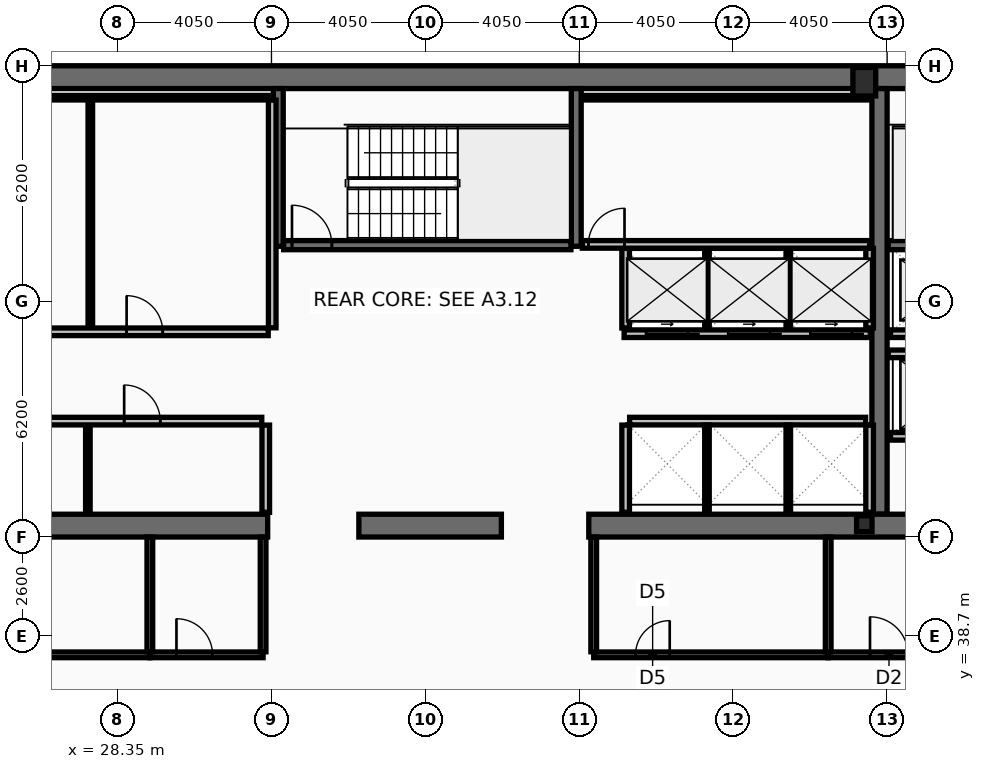
"""IFC4 building model, lengths in metres.
Left out: names, types, materials, properties, quantities, classifications, styles, units other than length and angle.
Written with IfcOpenShell. Run it as: python <this file> out.ifc"""

import sys

from ifc_helpers import new_model, si_unit, direction, frame, frame_2d, origin, origin_2d, place, context, subcontext, project, spatial, rectangle, hollow_rectangle, i_section, extrude, element, fill, save


model = new_model("IFC4")
c1 = context("Model", 3, precision=1e-05, world=origin(), true_north=direction((0.0, 1.0)))
c2 = subcontext(c1, "Body", "Model", "MODEL_VIEW")
j1 = project(units=[si_unit("LENGTHUNIT", "METRE"), si_unit("PLANEANGLEUNIT", "RADIAN")], contexts=[c1])
p1 = place(None, origin())
s1 = spatial("IfcSite", under=j1, at=p1, CompositionType="ELEMENT")
p2 = place(p1, origin())
s2 = spatial("IfcBuilding", under=s1, at=p2, CompositionType="ELEMENT")
p3 = place(p2, frame((0.0, 0.0, 253.4)))
s3 = spatial("IfcBuildingStorey", under=s2, at=p3, CompositionType="ELEMENT", Elevation=253.4)
p4 = place(p3, frame((16.2, 53.4, 0.0), z_axis=(0.0, 0.0, 1.0), x_axis=(1.0, 0.0, 0.0)))
e1 = element("IfcWall", 1, at=p4, inside=s3, PredefinedType="SHEAR", context=c2, shape_type="SweptSolid", body=[
    extrude(rectangle(XDim=40.5, YDim=0.6, at=frame_2d((20.25, 0.0))), origin(), (0.0, 0.0, 1.0), 3.38),
])
p5 = place(p3, frame((48.4, 41.9, 0.0), z_axis=(0.0, 0.0, 1.0), x_axis=(0.0, 1.0, 0.0)))
e2 = element("IfcWall", 2, at=p5, inside=s3, PredefinedType="SHEAR", context=c2, shape_type="SweptSolid", body=[
    extrude(rectangle(XDim=11.2, YDim=0.4, at=frame_2d((5.6, 0.0))), origin(), (0.0, 0.0, 1.0), 3.38),
])
p6 = place(p3, frame((32.3, 41.6, 0.0), z_axis=(0.0, 0.0, 1.0), x_axis=(-1.0, 0.0, 0.0)))
e3 = element("IfcWall", 3, at=p6, inside=s3, PredefinedType="SHEAR", context=c2, shape_type="SweptSolid", body=[
    extrude(rectangle(XDim=11.45, YDim=0.6, at=frame_2d((5.725, 0.0))), origin(), (0.0, 0.0, 1.0), 3.38),
])
p7 = place(p3, frame((38.45, 41.6, 0.0), z_axis=(0.0, 0.0, 1.0), x_axis=(-1.0, 0.0, 0.0)))
e4 = element("IfcWall", 4, at=p7, inside=s3, PredefinedType="SHEAR", context=c2, shape_type="SweptSolid", body=[
    extrude(rectangle(XDim=3.75, YDim=0.6, at=frame_2d((1.875, 0.0))), origin(), (0.0, 0.0, 1.0), 3.38),
])
p8 = place(p3, frame((52.05, 41.6, 0.0), z_axis=(0.0, 0.0, 1.0), x_axis=(-1.0, 0.0, 0.0)))
e5 = element("IfcWall", 5, at=p8, inside=s3, PredefinedType="SHEAR", context=c2, shape_type="SweptSolid", body=[
    extrude(rectangle(XDim=11.3, YDim=0.6, at=frame_2d((5.65, 0.0))), origin(), (0.0, 0.0, 1.0), 3.38),
])
for number, where, z_axis, x_axis in (
    (6, (32.58, 48.95, 0.0), (0.0, 0.0, 1.0), (0.0, 1.0, 0.0)),
    (7, (40.42, 48.95, 0.0), (0.0, 0.0, 1.0), (0.0, 1.0, 0.0)),
):
    element("IfcWall", number, at=place(p3, frame(where, z_axis=z_axis, x_axis=x_axis)), inside=s3, PredefinedType="SHEAR", context=c2, shape_type="SweptSolid", body=[
        extrude(rectangle(XDim=4.15, YDim=0.26, at=frame_2d((2.075, 0.0))), origin(), (0.0, 0.0, 1.0), 3.38),
    ])
p9 = place(p3, frame((48.63, 48.98, 0.0), z_axis=(0.0, 0.0, 1.0), x_axis=(1.0, 0.0, 0.0)))
e8 = element("IfcWall", 8, at=p9, inside=s3, PredefinedType="SHEAR", context=c2, shape_type="SweptSolid", body=[
    extrude(rectangle(XDim=7.47, YDim=0.24, at=frame_2d((3.735, 0.0))), origin(), (0.0, 0.0, 1.0), 3.38),
])
p10 = place(p9, frame((6.2, 0.0, 0.0)))
e9 = element("IfcOpeningElement", 9, at=p10, cuts=e8, PredefinedType="OPENING", context=c2, shape_type="SweptSolid", body=[
    extrude(rectangle(XDim=1.05, YDim=2.15, at=frame_2d((0.525, 1.075))), frame((0.0, 0.13, 0.0), z_axis=(0.0, -1.0, 0.0), x_axis=(1.0, 0.0, 0.0)), (0.0, 0.0, 1.0), 0.26),
])
p11 = place(p3, frame((32.72, 48.98, 0.0), z_axis=(0.0, 0.0, 1.0), x_axis=(1.0, 0.0, 0.0)))
e10 = element("IfcWall", 10, at=p11, inside=s3, PredefinedType="SHEAR", context=c2, shape_type="SweptSolid", body=[
    extrude(rectangle(XDim=7.56, YDim=0.24, at=frame_2d((3.78, 0.0))), origin(), (0.0, 0.0, 1.0), 3.38),
])
p12 = place(p11, frame((0.22, 0.0, 0.0)))
e11 = element("IfcOpeningElement", 11, at=p12, cuts=e10, PredefinedType="OPENING", context=c2, shape_type="SweptSolid", body=[
    extrude(rectangle(XDim=1.05, YDim=2.15, at=frame_2d((0.525, 1.075))), frame((0.0, 0.13, 0.0), z_axis=(0.0, -1.0, 0.0), x_axis=(1.0, 0.0, 0.0)), (0.0, 0.0, 1.0), 0.26),
])
p13 = place(p3, frame((48.0, 53.28, 0.0), z_axis=(0.0, 0.0, 1.0), x_axis=(1.0, 0.0, 0.0)))
e12 = element("IfcColumn", 12, at=p13, inside=s3, PredefinedType="COLUMN", context=c2, shape_type="SweptSolid", body=[
    extrude(hollow_rectangle(XDim=0.6, YDim=0.75, WallThickness=0.045, at=origin_2d()), origin(), (0.0, 0.0, 1.0), 3.6),
])
p14 = place(p3, frame((48.0, 41.65, 0.0), z_axis=(0.0, 0.0, 1.0), x_axis=(1.0, 0.0, 0.0)))
e13 = element("IfcColumn", 13, at=p14, inside=s3, PredefinedType="COLUMN", context=c2, shape_type="SweptSolid", body=[
    extrude(i_section(OverallWidth=0.406, OverallDepth=0.416, WebThickness=0.03, FlangeThickness=0.048, at=origin_2d()), origin(), (0.0, 0.0, 1.0), 3.6),
])
p15 = place(p3, frame((51.61, 43.95, 0.0), z_axis=(0.0, 0.0, 1.0), x_axis=(-1.0, 0.0, 0.0)))
e14 = element("IfcWall", 14, at=p15, inside=s3, PredefinedType="PARTITIONING", context=c2, shape_type="SweptSolid", body=[
    extrude(rectangle(XDim=2.92, YDim=0.2, at=frame_2d((1.46, 0.0))), origin(), (0.0, 0.0, 1.0), 3.38),
])
p16 = place(p15, frame((0.81, 0.0, 0.0)))
e15 = element("IfcOpeningElement", 15, at=p16, cuts=e14, PredefinedType="OPENING", context=c2, shape_type="SweptSolid", body=[
    extrude(rectangle(XDim=1.3, YDim=2.18, at=frame_2d((0.65, 1.09))), frame((0.0, 0.11, 0.0), z_axis=(0.0, -1.0, 0.0), x_axis=(1.0, 0.0, 0.0)), (0.0, 0.0, 1.0), 0.22),
])
p17 = place(p3, frame((51.61, 46.65, 0.0), z_axis=(0.0, 0.0, 1.0), x_axis=(-1.0, 0.0, 0.0)))
e16 = element("IfcWall", 16, at=p17, inside=s3, PredefinedType="PARTITIONING", context=c2, shape_type="SweptSolid", body=[
    extrude(rectangle(XDim=2.92, YDim=0.2, at=frame_2d((1.46, 0.0))), origin(), (0.0, 0.0, 1.0), 3.38),
])
p18 = place(p17, frame((0.86, 0.0, 0.0)))
e17 = element("IfcOpeningElement", 17, at=p18, cuts=e16, PredefinedType="OPENING", context=c2, shape_type="SweptSolid", body=[
    extrude(rectangle(XDim=1.2, YDim=2.18, at=frame_2d((0.6, 1.09))), frame((0.0, 0.11, 0.0), z_axis=(0.0, -1.0, 0.0), x_axis=(1.0, 0.0, 0.0)), (0.0, 0.0, 1.0), 0.22),
])
p19 = place(p3, frame((48.16, 46.65, 0.0), z_axis=(0.0, 0.0, 1.0), x_axis=(-1.0, 0.0, 0.0)))
e18 = element("IfcWall", 18, at=p19, inside=s3, PredefinedType="PARTITIONING", context=c2, shape_type="SweptSolid", body=[
    extrude(rectangle(XDim=6.48, YDim=0.2, at=frame_2d((3.24, 0.0))), origin(), (0.0, 0.0, 1.0), 3.38),
])
p20 = place(p19, frame((4.8, 0.0, 0.0)))
e19 = element("IfcOpeningElement", 19, at=p20, cuts=e18, PredefinedType="OPENING", context=c2, shape_type="SweptSolid", body=[
    extrude(rectangle(XDim=1.1, YDim=2.18, at=frame_2d((0.55, 1.09))), frame((0.0, 0.11, 0.0), z_axis=(0.0, -1.0, 0.0), x_axis=(1.0, 0.0, 0.0)), (0.0, 0.0, 1.0), 0.22),
])
p21 = place(p19, frame((2.64, 0.0, 0.0)))
e20 = element("IfcOpeningElement", 20, at=p21, cuts=e18, PredefinedType="OPENING", context=c2, shape_type="SweptSolid", body=[
    extrude(rectangle(XDim=1.1, YDim=2.18, at=frame_2d((0.55, 1.09))), frame((0.0, 0.11, 0.0), z_axis=(0.0, -1.0, 0.0), x_axis=(1.0, 0.0, 0.0)), (0.0, 0.0, 1.0), 0.22),
])
p22 = place(p19, frame((0.48, 0.0, 0.0)))
e21 = element("IfcOpeningElement", 21, at=p22, cuts=e18, PredefinedType="OPENING", context=c2, shape_type="SweptSolid", body=[
    extrude(rectangle(XDim=1.1, YDim=2.18, at=frame_2d((0.55, 1.09))), frame((0.0, 0.11, 0.0), z_axis=(0.0, -1.0, 0.0), x_axis=(1.0, 0.0, 0.0)), (0.0, 0.0, 1.0), 0.22),
])
p23 = place(p3, frame((48.63, 46.12, 0.0), z_axis=(0.0, 0.0, 1.0), x_axis=(1.0, 0.0, 0.0)))
e22 = element("IfcWall", 22, at=p23, inside=s3, PredefinedType="PARTITIONING", context=c2, shape_type="SweptSolid", body=[
    extrude(rectangle(XDim=3.07, YDim=0.2, at=frame_2d((1.535, 0.0))), origin(), (0.0, 0.0, 1.0), 3.38),
])
p24 = place(p3, frame((32.42, 46.805, 0.0), z_axis=(0.0, 0.0, 1.0), x_axis=(0.0, 1.0, 0.0)))
e23 = element("IfcWall", 23, at=p24, inside=s3, PredefinedType="PARTITIONING", context=c2, shape_type="SweptSolid", body=[
    extrude(rectangle(XDim=5.99, YDim=0.2, at=frame_2d((2.995, 0.0))), origin(), (0.0, 0.0, 1.0), 3.38),
])
p25 = place(p3, frame((24.805, 52.86, 0.0), z_axis=(0.0, 0.0, 1.0), x_axis=(1.0, 0.0, 0.0)))
e24 = element("IfcWall", 24, at=p25, inside=s3, PredefinedType="PARTITIONING", context=c2, shape_type="SweptSolid", body=[
    extrude(rectangle(XDim=7.51, YDim=0.12, at=frame_2d((3.755, 0.0))), origin(), (0.0, 0.0, 1.0), 3.38),
])
p26 = place(p3, frame((27.634, 46.805, 0.0), z_axis=(0.0, 0.0, 1.0), x_axis=(0.0, 1.0, 0.0)))
e25 = element("IfcWall", 25, at=p26, inside=s3, PredefinedType="PARTITIONING", context=c2, shape_type="SweptSolid", body=[
    extrude(rectangle(XDim=5.99, YDim=0.12, at=frame_2d((2.995, 0.0))), origin(), (0.0, 0.0, 1.0), 3.38),
])
p27 = place(p3, frame((24.805, 46.7, 0.0), z_axis=(0.0, 0.0, 1.0), x_axis=(1.0, 0.0, 0.0)))
e26 = element("IfcWall", 26, at=p27, inside=s3, PredefinedType="PARTITIONING", context=c2, shape_type="SweptSolid", body=[
    extrude(rectangle(XDim=7.51, YDim=0.2, at=frame_2d((3.755, 0.0))), origin(), (0.0, 0.0, 1.0), 3.38),
])
p28 = place(p27, frame((0.55, 0.0, 0.0)))
e27 = element("IfcOpeningElement", 27, at=p28, cuts=e26, PredefinedType="OPENING", context=c2, shape_type="SweptSolid", body=[
    extrude(rectangle(XDim=0.95, YDim=2.1, at=frame_2d((0.475, 1.05))), frame((0.0, 0.11, 0.0), z_axis=(0.0, -1.0, 0.0), x_axis=(1.0, 0.0, 0.0)), (0.0, 0.0, 1.0), 0.22),
])
p29 = place(p27, frame((3.784, 0.0, 0.0)))
e28 = element("IfcOpeningElement", 28, at=p29, cuts=e26, PredefinedType="OPENING", context=c2, shape_type="SweptSolid", body=[
    extrude(rectangle(XDim=0.95, YDim=2.1, at=frame_2d((0.475, 1.05))), frame((0.0, 0.11, 0.0), z_axis=(0.0, -1.0, 0.0), x_axis=(1.0, 0.0, 0.0)), (0.0, 0.0, 1.0), 0.22),
])
p30 = place(p3, frame((32.25, 41.95, 0.0), z_axis=(0.0, 0.0, 1.0), x_axis=(0.0, 1.0, 0.0)))
e29 = element("IfcWall", 29, at=p30, inside=s3, PredefinedType="PARTITIONING", context=c2, shape_type="SweptSolid", body=[
    extrude(rectangle(XDim=2.295, YDim=0.2, at=frame_2d((1.147, 0.0))), origin(), (0.0, 0.0, 1.0), 3.38),
])
p31 = place(p3, frame((27.569, 41.95, 0.0), z_axis=(0.0, 0.0, 1.0), x_axis=(0.0, 1.0, 0.0)))
e30 = element("IfcWall", 30, at=p31, inside=s3, PredefinedType="PARTITIONING", context=c2, shape_type="SweptSolid", body=[
    extrude(rectangle(XDim=2.295, YDim=0.12, at=frame_2d((1.147, 0.0))), origin(), (0.0, 0.0, 1.0), 3.38),
])
p32 = place(p3, frame((24.805, 44.35, 0.0), z_axis=(0.0, 0.0, 1.0), x_axis=(1.0, 0.0, 0.0)))
e31 = element("IfcWall", 31, at=p32, inside=s3, PredefinedType="PARTITIONING", context=c2, shape_type="SweptSolid", body=[
    extrude(rectangle(XDim=7.34, YDim=0.2, at=frame_2d((3.67, 0.0))), origin(), (0.0, 0.0, 1.0), 3.38),
])
p33 = place(p32, frame((0.55, 0.0, 0.0)))
e32 = element("IfcOpeningElement", 32, at=p33, cuts=e31, PredefinedType="OPENING", context=c2, shape_type="SweptSolid", body=[
    extrude(rectangle(XDim=0.95, YDim=2.1, at=frame_2d((0.475, 1.05))), frame((0.0, 0.11, 0.0), z_axis=(0.0, -1.0, 0.0), x_axis=(1.0, 0.0, 0.0)), (0.0, 0.0, 1.0), 0.22),
])
p34 = place(p32, frame((3.719, 0.0, 0.0)))
e33 = element("IfcOpeningElement", 33, at=p34, cuts=e31, PredefinedType="OPENING", context=c2, shape_type="SweptSolid", body=[
    extrude(rectangle(XDim=0.95, YDim=2.1, at=frame_2d((0.475, 1.05))), frame((0.0, 0.11, 0.0), z_axis=(0.0, -1.0, 0.0), x_axis=(1.0, 0.0, 0.0)), (0.0, 0.0, 1.0), 0.22),
])
for number, where, z_axis, x_axis in (
    (34, (41.72, 46.8, 0.0), (0.0, 0.0, 1.0), (0.0, 1.0, 0.0)),
    (35, (48.14, 46.8, 0.0), (0.0, 0.0, 1.0), (0.0, 1.0, 0.0)),
):
    element("IfcWall", number, at=place(p3, frame(where, z_axis=z_axis, x_axis=x_axis)), inside=s3, PredefinedType="PARTITIONING", context=c2, shape_type="SweptSolid", body=[
        extrude(rectangle(XDim=2.095, YDim=0.2, at=frame_2d((1.047, 0.0))), origin(), (0.0, 0.0, 1.0), 3.38),
    ])
for number, where, z_axis, x_axis in (
    (36, (43.86, 46.8, 0.0), (0.0, 0.0, 1.0), (0.0, 1.0, 0.0)),
    (37, (46.0, 46.8, 0.0), (0.0, 0.0, 1.0), (0.0, 1.0, 0.0)),
):
    element("IfcWall", number, at=place(p3, frame(where, z_axis=z_axis, x_axis=x_axis)), inside=s3, PredefinedType="PARTITIONING", context=c2, shape_type="SweptSolid", body=[
        extrude(rectangle(XDim=2.095, YDim=0.12, at=frame_2d((1.047, 0.0))), origin(), (0.0, 0.0, 1.0), 3.38),
    ])
p35 = place(p3, frame((41.825, 44.35, 0.0), z_axis=(0.0, 0.0, 1.0), x_axis=(1.0, 0.0, 0.0)))
e38 = element("IfcWall", 38, at=p35, inside=s3, PredefinedType="PARTITIONING", context=c2, shape_type="SweptSolid", body=[
    extrude(rectangle(XDim=6.21, YDim=0.2, at=frame_2d((3.105, 0.0))), origin(), (0.0, 0.0, 1.0), 3.38),
])
for number, where, z_axis, x_axis in (
    (39, (41.72, 41.95, 0.0), (0.0, 0.0, 1.0), (0.0, 1.0, 0.0)),
    (40, (48.14, 41.95, 0.0), (0.0, 0.0, 1.0), (0.0, 1.0, 0.0)),
):
    element("IfcWall", number, at=place(p3, frame(where, z_axis=z_axis, x_axis=x_axis)), inside=s3, PredefinedType="PARTITIONING", context=c2, shape_type="SweptSolid", body=[
        extrude(rectangle(XDim=2.295, YDim=0.2, at=frame_2d((1.147, 0.0))), origin(), (0.0, 0.0, 1.0), 3.38),
    ])
for number, where, z_axis, x_axis in (
    (41, (43.86, 41.95, 0.0), (0.0, 0.0, 1.0), (0.0, 1.0, 0.0)),
    (42, (46.0, 41.95, 0.0), (0.0, 0.0, 1.0), (0.0, 1.0, 0.0)),
):
    element("IfcWall", number, at=place(p3, frame(where, z_axis=z_axis, x_axis=x_axis)), inside=s3, PredefinedType="PARTITIONING", context=c2, shape_type="SweptSolid", body=[
        extrude(rectangle(XDim=2.295, YDim=0.12, at=frame_2d((1.147, 0.0))), origin(), (0.0, 0.0, 1.0), 3.38),
    ])
p36 = place(p3, frame((40.58, 52.86, 0.0), z_axis=(0.0, 0.0, 1.0), x_axis=(1.0, 0.0, 0.0)))
e43 = element("IfcWall", 43, at=p36, inside=s3, PredefinedType="PARTITIONING", context=c2, shape_type="SweptSolid", body=[
    extrude(rectangle(XDim=7.56, YDim=0.12, at=frame_2d((3.78, 0.0))), origin(), (0.0, 0.0, 1.0), 3.38),
])
p37 = place(p3, frame((40.58, 49.0, 0.0), z_axis=(0.0, 0.0, 1.0), x_axis=(1.0, 0.0, 0.0)))
e44 = element("IfcWall", 44, at=p37, inside=s3, PredefinedType="PARTITIONING", context=c2, shape_type="SweptSolid", body=[
    extrude(rectangle(XDim=7.56, YDim=0.2, at=frame_2d((3.78, 0.0))), origin(), (0.0, 0.0, 1.0), 3.38),
])
p38 = place(p37, frame((0.16, 0.0, 0.0)))
e45 = element("IfcOpeningElement", 45, at=p38, cuts=e44, PredefinedType="OPENING", context=c2, shape_type="SweptSolid", body=[
    extrude(rectangle(XDim=0.95, YDim=2.1, at=frame_2d((0.475, 1.05))), frame((0.0, 0.11, 0.0), z_axis=(0.0, -1.0, 0.0), x_axis=(1.0, 0.0, 0.0)), (0.0, 0.0, 1.0), 0.22),
])
p39 = place(p3, frame((24.3, 38.2, 0.0), z_axis=(0.0, 0.0, 1.0), x_axis=(1.0, 0.0, 0.0)))
e46 = element("IfcWall", 46, at=p39, inside=s3, PredefinedType="PARTITIONING", context=c2, shape_type="SweptSolid", body=[
    extrude(rectangle(XDim=4.9, YDim=0.15, at=frame_2d((2.45, 0.0))), origin(), (0.0, 0.0, 1.0), 2.72),
])
p40 = place(p39, frame((0.9, 0.0, 0.0)))
e47 = element("IfcOpeningElement", 47, at=p40, cuts=e46, PredefinedType="OPENING", context=c2, shape_type="SweptSolid", body=[
    extrude(rectangle(XDim=0.95, YDim=2.05, at=frame_2d((0.475, 1.025))), frame((0.0, 0.085, 0.0), z_axis=(0.0, -1.0, 0.0), x_axis=(1.0, 0.0, 0.0)), (0.0, 0.0, 1.0), 0.17),
])
p41 = place(p3, frame((29.2, 38.2, 0.0), z_axis=(0.0, 0.0, 1.0), x_axis=(1.0, 0.0, 0.0)))
e48 = element("IfcWall", 48, at=p41, inside=s3, PredefinedType="PARTITIONING", context=c2, shape_type="SweptSolid", body=[
    extrude(rectangle(XDim=2.98, YDim=0.15, at=frame_2d((1.49, 0.0))), origin(), (0.0, 0.0, 1.0), 2.72),
])
p42 = place(p41, frame((0.7, 0.0, 0.0)))
e49 = element("IfcOpeningElement", 49, at=p42, cuts=e48, PredefinedType="OPENING", context=c2, shape_type="SweptSolid", body=[
    extrude(rectangle(XDim=0.95, YDim=2.05, at=frame_2d((0.475, 1.025))), frame((0.0, 0.085, 0.0), z_axis=(0.0, -1.0, 0.0), x_axis=(1.0, 0.0, 0.0)), (0.0, 0.0, 1.0), 0.17),
])
for number, where, z_axis, x_axis in (
    (50, (29.2, 38.28, 0.0), (0.0, 0.0, 1.0), (0.0, 1.0, 0.0)),
    (51, (32.18, 38.28, 0.0), (0.0, 0.0, 1.0), (0.0, 1.0, 0.0)),
):
    element("IfcWall", number, at=place(p3, frame(where, z_axis=z_axis, x_axis=x_axis)), inside=s3, PredefinedType="PARTITIONING", context=c2, shape_type="SweptSolid", body=[
        extrude(rectangle(XDim=3.02, YDim=0.15, at=frame_2d((1.51, 0.0))), origin(), (0.0, 0.0, 1.0), 3.38),
    ])
p43 = place(p3, frame((40.88, 38.2, 0.0), z_axis=(0.0, 0.0, 1.0), x_axis=(1.0, 0.0, 0.0)))
e52 = element("IfcWall", 52, at=p43, inside=s3, PredefinedType="PARTITIONING", context=c2, shape_type="SweptSolid", body=[
    extrude(rectangle(XDim=6.17, YDim=0.15, at=frame_2d((3.085, 0.0))), origin(), (0.0, 0.0, 1.0), 2.72),
])
p44 = place(p43, frame((1.1, 0.0, 0.0)))
e53 = element("IfcOpeningElement", 53, at=p44, cuts=e52, PredefinedType="OPENING", context=c2, shape_type="SweptSolid", body=[
    extrude(rectangle(XDim=0.9, YDim=2.05, at=frame_2d((0.45, 1.025))), frame((0.0, 0.085, 0.0), z_axis=(0.0, -1.0, 0.0), x_axis=(1.0, 0.0, 0.0)), (0.0, 0.0, 1.0), 0.17),
])
p45 = place(p3, frame((47.05, 38.2, 0.0), z_axis=(0.0, 0.0, 1.0), x_axis=(1.0, 0.0, 0.0)))
e54 = element("IfcWall", 54, at=p45, inside=s3, PredefinedType="PARTITIONING", context=c2, shape_type="SweptSolid", body=[
    extrude(rectangle(XDim=4.9, YDim=0.15, at=frame_2d((2.45, 0.0))), origin(), (0.0, 0.0, 1.0), 2.72),
])
p46 = place(p45, frame((1.1, 0.0, 0.0)))
e55 = element("IfcOpeningElement", 55, at=p46, cuts=e54, PredefinedType="OPENING", context=c2, shape_type="SweptSolid", body=[
    extrude(rectangle(XDim=1.0, YDim=2.05, at=frame_2d((0.5, 1.025))), frame((0.0, 0.085, 0.0), z_axis=(0.0, -1.0, 0.0), x_axis=(1.0, 0.0, 0.0)), (0.0, 0.0, 1.0), 0.17),
])
for number, where, z_axis, x_axis in (
    (56, (40.88, 38.28, 0.0), (0.0, 0.0, 1.0), (0.0, 1.0, 0.0)),
    (57, (47.05, 38.28, 0.0), (0.0, 0.0, 1.0), (0.0, 1.0, 0.0)),
):
    element("IfcWall", number, at=place(p3, frame(where, z_axis=z_axis, x_axis=x_axis)), inside=s3, PredefinedType="PARTITIONING", context=c2, shape_type="SweptSolid", body=[
        extrude(rectangle(XDim=3.02, YDim=0.15, at=frame_2d((1.51, 0.0))), origin(), (0.0, 0.0, 1.0), 3.38),
    ])
p47 = place(p12, origin())
e58 = element("IfcDoor", 58, at=p47, inside=s3, OperationType="SINGLE_SWING_LEFT", PredefinedType="DOOR", context=c2, shape_type="SweptSolid", body=[
    extrude(rectangle(XDim=1.05, YDim=2.15, at=frame_2d((0.525, 1.075))), frame((0.0, 0.025, 0.0), z_axis=(0.0, -1.0, 0.0), x_axis=(1.0, 0.0, 0.0)), (0.0, 0.0, 1.0), 0.05),
])
fill(e11, e58)
p48 = place(p20, origin())
e59 = element("IfcDoor", 59, at=p48, inside=s3, OperationType="SLIDING_TO_LEFT", PredefinedType="DOOR", context=c2, shape_type="SweptSolid", body=[
    extrude(rectangle(XDim=1.1, YDim=2.18, at=frame_2d((0.55, 1.09))), frame((0.0, 0.025, 0.0), z_axis=(0.0, -1.0, 0.0), x_axis=(1.0, 0.0, 0.0)), (0.0, 0.0, 1.0), 0.05),
])
fill(e19, e59)
p49 = place(p21, origin())
e60 = element("IfcDoor", 60, at=p49, inside=s3, OperationType="SLIDING_TO_LEFT", PredefinedType="DOOR", context=c2, shape_type="SweptSolid", body=[
    extrude(rectangle(XDim=1.1, YDim=2.18, at=frame_2d((0.55, 1.09))), frame((0.0, 0.025, 0.0), z_axis=(0.0, -1.0, 0.0), x_axis=(1.0, 0.0, 0.0)), (0.0, 0.0, 1.0), 0.05),
])
fill(e20, e60)
p50 = place(p22, origin())
e61 = element("IfcDoor", 61, at=p50, inside=s3, OperationType="SLIDING_TO_LEFT", PredefinedType="DOOR", context=c2, shape_type="SweptSolid", body=[
    extrude(rectangle(XDim=1.1, YDim=2.18, at=frame_2d((0.55, 1.09))), frame((0.0, 0.025, 0.0), z_axis=(0.0, -1.0, 0.0), x_axis=(1.0, 0.0, 0.0)), (0.0, 0.0, 1.0), 0.05),
])
fill(e21, e61)
p51 = place(p29, origin())
e62 = element("IfcDoor", 62, at=p51, inside=s3, OperationType="SINGLE_SWING_LEFT", PredefinedType="DOOR", context=c2, shape_type="SweptSolid", body=[
    extrude(rectangle(XDim=0.95, YDim=2.1, at=frame_2d((0.475, 1.05))), frame((0.0, 0.025, 0.0), z_axis=(0.0, -1.0, 0.0), x_axis=(1.0, 0.0, 0.0)), (0.0, 0.0, 1.0), 0.05),
])
fill(e28, e62)
p52 = place(p34, origin())
e63 = element("IfcDoor", 63, at=p52, inside=s3, OperationType="SINGLE_SWING_LEFT", PredefinedType="DOOR", context=c2, shape_type="SweptSolid", body=[
    extrude(rectangle(XDim=0.95, YDim=2.1, at=frame_2d((0.475, 1.05))), frame((0.0, 0.025, 0.0), z_axis=(0.0, -1.0, 0.0), x_axis=(1.0, 0.0, 0.0)), (0.0, 0.0, 1.0), 0.05),
])
fill(e33, e63)
p53 = place(p38, origin())
e64 = element("IfcDoor", 64, at=p53, inside=s3, OperationType="SINGLE_SWING_RIGHT", PredefinedType="DOOR", context=c2, shape_type="SweptSolid", body=[
    extrude(rectangle(XDim=0.95, YDim=2.1, at=frame_2d((0.475, 1.05))), frame((0.0, 0.025, 0.0), z_axis=(0.0, -1.0, 0.0), x_axis=(1.0, 0.0, 0.0)), (0.0, 0.0, 1.0), 0.05),
])
fill(e45, e64)
p54 = place(p42, origin())
e65 = element("IfcDoor", 65, at=p54, inside=s3, OperationType="SINGLE_SWING_LEFT", PredefinedType="DOOR", context=c2, shape_type="SweptSolid", body=[
    extrude(rectangle(XDim=0.95, YDim=2.05, at=frame_2d((0.475, 1.025))), frame((0.0, 0.025, 0.0), z_axis=(0.0, -1.0, 0.0), x_axis=(1.0, 0.0, 0.0)), (0.0, 0.0, 1.0), 0.05),
])
fill(e49, e65)
p55 = place(p44, origin())
e66 = element("IfcDoor", 66, at=p55, inside=s3, OperationType="SINGLE_SWING_RIGHT", PredefinedType="DOOR", context=c2, shape_type="SweptSolid", body=[
    extrude(rectangle(XDim=0.9, YDim=2.05, at=frame_2d((0.45, 1.025))), frame((0.0, 0.025, 0.0), z_axis=(0.0, -1.0, 0.0), x_axis=(1.0, 0.0, 0.0)), (0.0, 0.0, 1.0), 0.05),
])
fill(e53, e66)
p56 = place(p46, origin())
e67 = element("IfcDoor", 67, at=p56, inside=s3, OperationType="SINGLE_SWING_LEFT", PredefinedType="DOOR", context=c2, shape_type="SweptSolid", body=[
    extrude(rectangle(XDim=1.0, YDim=2.05, at=frame_2d((0.5, 1.025))), frame((0.0, 0.025, 0.0), z_axis=(0.0, -1.0, 0.0), x_axis=(1.0, 0.0, 0.0)), (0.0, 0.0, 1.0), 0.05),
])
fill(e55, e67)
save(model, sys.argv[1])
